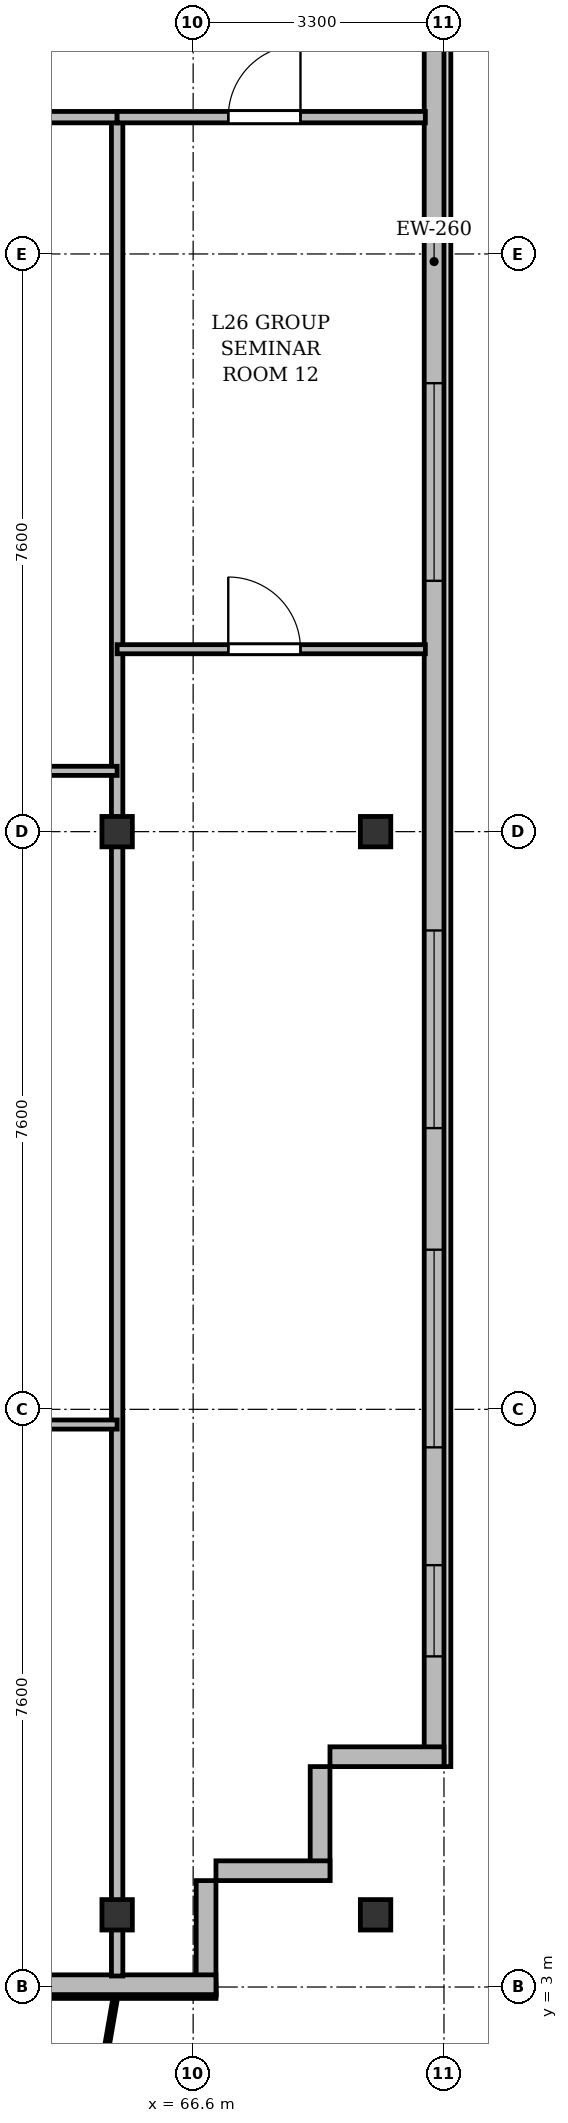
"""IFC4 building model, lengths in metres.
Left out: names, types, materials, properties, quantities, classifications, styles, units other than length and angle.
Written with IfcOpenShell. Run it as: python <this file> out.ifc"""

import sys

from ifc_helpers import new_model, si_unit, direction, frame, frame_2d, origin, origin_2d, place, context, subcontext, project, spatial, rectangle, i_section, extrude, source, transform, mapped, element, fill, save


model = new_model("IFC4")
c1 = context("Model", 3, precision=1e-05, world=origin(), true_north=direction((0.0, 1.0)))
c2 = subcontext(c1, "Body", "Model", "MODEL_VIEW")
j1 = project(units=[si_unit("LENGTHUNIT", "METRE"), si_unit("PLANEANGLEUNIT", "RADIAN")], contexts=[c1])
p1 = place(None, origin())
s1 = spatial("IfcSite", under=j1, at=p1, CompositionType="ELEMENT")
p2 = place(p1, origin())
s2 = spatial("IfcBuilding", under=s1, at=p2, CompositionType="ELEMENT")
p3 = place(p2, frame((0.0, 0.0, 103.3)))
s3 = spatial("IfcBuildingStorey", under=s2, at=p3, CompositionType="ELEMENT", Elevation=103.3)
m1 = source(origin(), c2, "Body", "SweptSolid", [
    extrude(i_section(OverallWidth=0.4, OverallDepth=0.4, WebThickness=0.022, FlangeThickness=0.035, at=origin_2d()), origin(), (0.0, 0.0, 1.0), 3.6),
])
for number, where, z_axis, x_axis in (
    (1, (65.6, 3.95, 0.0), (0.0, 0.0, 1.0), (1.0, 0.0, 0.0)),
    (2, (65.6, 18.2, 0.0), (0.0, 0.0, 1.0), (1.0, 0.0, 0.0)),
    (3, (69.0, 3.95, 0.0), (0.0, 0.0, 1.0), (1.0, 0.0, 0.0)),
    (4, (69.0, 18.2, 0.0), (0.0, 0.0, 1.0), (1.0, 0.0, 0.0)),
):
    element("IfcColumn", number, at=place(p3, frame(where, z_axis=z_axis, x_axis=x_axis)), inside=s3, PredefinedType="COLUMN", context=c2, shape_type="MappedRepresentation", body=[
        mapped(m1, transform((0.0, 0.0, 0.0), x_axis=(1.0, 0.0, 0.0), y_axis=(0.0, 1.0, 0.0), z_axis=(0.0, 0.0, 1.0), scale=1.0)),
    ])
p4 = place(p3, frame((69.77, 45.5, 0.0), z_axis=(0.0, 0.0, 1.0), x_axis=(0.0, -1.0, 0.0)))
e5 = element("IfcWall", 5, at=p4, inside=s3, PredefinedType="SOLIDWALL", context=c2, shape_type="SweptSolid", body=[
    extrude(rectangle(XDim=39.6, YDim=0.26, at=frame_2d((19.8, 0.0))), origin(), (0.0, 0.0, 1.0), 3.34),
])
p5 = place(p4, frame((36.95, 0.0, 0.92)))
e6 = element("IfcOpeningElement", 6, at=p5, cuts=e5, PredefinedType="OPENING", context=c2, shape_type="SweptSolid", body=[
    extrude(rectangle(XDim=1.2, YDim=1.65, at=frame_2d((0.6, 0.825))), frame((0.0, 0.14, 0.0), z_axis=(0.0, -1.0, 0.0), x_axis=(1.0, 0.0, 0.0)), (0.0, 0.0, 1.0), 0.28),
])
p6 = place(p4, frame((32.8, 0.0, 0.92)))
e7 = element("IfcOpeningElement", 7, at=p6, cuts=e5, PredefinedType="OPENING", context=c2, shape_type="SweptSolid", body=[
    extrude(rectangle(XDim=2.6, YDim=1.9, at=frame_2d((1.3, 0.95))), frame((0.0, 0.14, 0.0), z_axis=(0.0, -1.0, 0.0), x_axis=(1.0, 0.0, 0.0)), (0.0, 0.0, 1.0), 0.28),
])
p7 = place(p4, frame((28.6, 0.0, 0.92)))
e8 = element("IfcOpeningElement", 8, at=p7, cuts=e5, PredefinedType="OPENING", context=c2, shape_type="SweptSolid", body=[
    extrude(rectangle(XDim=2.6, YDim=1.9, at=frame_2d((1.3, 0.95))), frame((0.0, 0.14, 0.0), z_axis=(0.0, -1.0, 0.0), x_axis=(1.0, 0.0, 0.0)), (0.0, 0.0, 1.0), 0.28),
])
p8 = place(p4, frame((21.4, 0.0, 0.92)))
e9 = element("IfcOpeningElement", 9, at=p8, cuts=e5, PredefinedType="OPENING", context=c2, shape_type="SweptSolid", body=[
    extrude(rectangle(XDim=2.6, YDim=1.9, at=frame_2d((1.3, 0.95))), frame((0.0, 0.14, 0.0), z_axis=(0.0, -1.0, 0.0), x_axis=(1.0, 0.0, 0.0)), (0.0, 0.0, 1.0), 0.28),
])
p9 = place(p4, frame((7.4, 0.0, 0.92)))
e10 = element("IfcOpeningElement", 10, at=p9, cuts=e5, PredefinedType="OPENING", context=c2, shape_type="SweptSolid", body=[
    extrude(rectangle(XDim=2.6, YDim=1.9, at=frame_2d((1.3, 0.95))), frame((0.0, 0.14, 0.0), z_axis=(0.0, -1.0, 0.0), x_axis=(1.0, 0.0, 0.0)), (0.0, 0.0, 1.0), 0.28),
])
p10 = place(p4, frame((4.5, 0.0, 0.92)))
e11 = element("IfcOpeningElement", 11, at=p10, cuts=e5, PredefinedType="OPENING", context=c2, shape_type="SweptSolid", body=[
    extrude(rectangle(XDim=1.2, YDim=1.65, at=frame_2d((0.6, 0.825))), frame((0.0, 0.14, 0.0), z_axis=(0.0, -1.0, 0.0), x_axis=(1.0, 0.0, 0.0)), (0.0, 0.0, 1.0), 0.28),
])
p11 = place(p4, frame((1.15, 0.0, 0.92)))
e12 = element("IfcOpeningElement", 12, at=p11, cuts=e5, PredefinedType="OPENING", context=c2, shape_type="SweptSolid", body=[
    extrude(rectangle(XDim=1.2, YDim=1.65, at=frame_2d((0.6, 0.825))), frame((0.0, 0.14, 0.0), z_axis=(0.0, -1.0, 0.0), x_axis=(1.0, 0.0, 0.0)), (0.0, 0.0, 1.0), 0.28),
])
p12 = place(p3, frame((69.9, 6.03, 0.0), z_axis=(0.0, 0.0, 1.0), x_axis=(-1.0, 0.0, 0.0)))
e13 = element("IfcWall", 13, at=p12, inside=s3, PredefinedType="SOLIDWALL", context=c2, shape_type="SweptSolid", body=[
    extrude(rectangle(XDim=1.5, YDim=0.26, at=frame_2d((0.75, 0.0))), origin(), (0.0, 0.0, 1.0), 2.84),
])
for number, where, z_axis, x_axis in (
    (14, (68.27, 5.9, 0.0), (0.0, 0.0, 1.0), (0.0, -1.0, 0.0)),
    (15, (68.4, 4.53, 0.0), (0.0, 0.0, 1.0), (-1.0, 0.0, 0.0)),
):
    element("IfcWall", number, at=place(p3, frame(where, z_axis=z_axis, x_axis=x_axis)), inside=s3, PredefinedType="SOLIDWALL", context=c2, shape_type="SweptSolid", body=[
        extrude(rectangle(XDim=1.5, YDim=0.26, at=frame_2d((0.75, 0.0))), origin(), (0.0, 0.0, 1.0), 3.34),
    ])
p13 = place(p3, frame((66.77, 4.4, 0.0), z_axis=(0.0, 0.0, 1.0), x_axis=(0.0, -1.0, 0.0)))
e16 = element("IfcWall", 16, at=p13, inside=s3, PredefinedType="SOLIDWALL", context=c2, shape_type="SweptSolid", body=[
    extrude(rectangle(XDim=1.5, YDim=0.26, at=frame_2d((0.75, 0.0))), origin(), (0.0, 0.0, 1.0), 2.752),
])
p14 = place(p3, frame((66.9, 3.03, 0.0), z_axis=(0.0, 0.0, 1.0), x_axis=(-1.0, 0.0, 0.0)))
e17 = element("IfcWall", 17, at=p14, inside=s3, PredefinedType="SOLIDWALL", context=c2, shape_type="SweptSolid", body=[
    extrude(rectangle(XDim=59.4, YDim=0.26, at=frame_2d((29.7, 0.0))), origin(), (0.0, 0.0, 1.0), 3.34),
])
p15 = place(p14, frame((2.25, 0.0, 0.9)))
e18 = element("IfcOpeningElement", 18, at=p15, cuts=e17, PredefinedType="OPENING", context=c2, shape_type="SweptSolid", body=[
    extrude(rectangle(XDim=1.5, YDim=1.75, at=frame_2d((0.75, 0.875))), frame((0.0, 0.14, 0.0), z_axis=(0.0, -1.0, 0.0), x_axis=(1.0, 0.0, 0.0)), (0.0, 0.0, 1.0), 0.28),
])
p16 = place(p14, frame((5.4, 0.0, 0.9)))
e19 = element("IfcOpeningElement", 19, at=p16, cuts=e17, PredefinedType="OPENING", context=c2, shape_type="SweptSolid", body=[
    extrude(rectangle(XDim=2.0, YDim=1.95, at=frame_2d((1.0, 0.975))), frame((0.0, 0.14, 0.0), z_axis=(0.0, -1.0, 0.0), x_axis=(1.0, 0.0, 0.0)), (0.0, 0.0, 1.0), 0.28),
])
p17 = place(p14, frame((9.213, 0.0, 0.0)))
e20 = element("IfcOpeningElement", 20, at=p17, cuts=e17, PredefinedType="OPENING", context=c2, shape_type="SweptSolid", body=[
    extrude(rectangle(XDim=1.2, YDim=2.2, at=frame_2d((0.6, 1.1))), frame((0.0, 0.14, 0.0), z_axis=(0.0, -1.0, 0.0), x_axis=(1.0, 0.0, 0.0)), (0.0, 0.0, 1.0), 0.28),
])
p18 = place(p14, frame((13.0, 0.0, 0.9)))
e21 = element("IfcOpeningElement", 21, at=p18, cuts=e17, PredefinedType="OPENING", context=c2, shape_type="SweptSolid", body=[
    extrude(rectangle(XDim=1.8, YDim=1.8, at=frame_2d((0.9, 0.9))), frame((0.0, 0.14, 0.0), z_axis=(0.0, -1.0, 0.0), x_axis=(1.0, 0.0, 0.0)), (0.0, 0.0, 1.0), 0.28),
])
p19 = place(p14, frame((16.6, 0.0, 0.9)))
e22 = element("IfcOpeningElement", 22, at=p19, cuts=e17, PredefinedType="OPENING", context=c2, shape_type="SweptSolid", body=[
    extrude(rectangle(XDim=2.2, YDim=1.8, at=frame_2d((1.1, 0.9))), frame((0.0, 0.14, 0.0), z_axis=(0.0, -1.0, 0.0), x_axis=(1.0, 0.0, 0.0)), (0.0, 0.0, 1.0), 0.28),
])
p20 = place(p14, frame((20.55, 0.0, 0.9)))
e23 = element("IfcOpeningElement", 23, at=p20, cuts=e17, PredefinedType="OPENING", context=c2, shape_type="SweptSolid", body=[
    extrude(rectangle(XDim=1.5, YDim=1.75, at=frame_2d((0.75, 0.875))), frame((0.0, 0.14, 0.0), z_axis=(0.0, -1.0, 0.0), x_axis=(1.0, 0.0, 0.0)), (0.0, 0.0, 1.0), 0.28),
])
p21 = place(p14, frame((25.4, 0.0, 0.9)))
e24 = element("IfcOpeningElement", 24, at=p21, cuts=e17, PredefinedType="OPENING", context=c2, shape_type="SweptSolid", body=[
    extrude(rectangle(XDim=2.0, YDim=1.95, at=frame_2d((1.0, 0.975))), frame((0.0, 0.14, 0.0), z_axis=(0.0, -1.0, 0.0), x_axis=(1.0, 0.0, 0.0)), (0.0, 0.0, 1.0), 0.28),
])
p22 = place(p14, frame((32.175, 0.0, 0.9)))
e25 = element("IfcOpeningElement", 25, at=p22, cuts=e17, PredefinedType="OPENING", context=c2, shape_type="SweptSolid", body=[
    extrude(rectangle(XDim=1.65, YDim=1.85, at=frame_2d((0.825, 0.925))), frame((0.0, 0.14, 0.0), z_axis=(0.0, -1.0, 0.0), x_axis=(1.0, 0.0, 0.0)), (0.0, 0.0, 1.0), 0.28),
])
p23 = place(p14, frame((37.584, 0.0, 0.0)))
e26 = element("IfcOpeningElement", 26, at=p23, cuts=e17, PredefinedType="OPENING", context=c2, shape_type="SweptSolid", body=[
    extrude(rectangle(XDim=1.2, YDim=2.2, at=frame_2d((0.6, 1.1))), frame((0.0, 0.14, 0.0), z_axis=(0.0, -1.0, 0.0), x_axis=(1.0, 0.0, 0.0)), (0.0, 0.0, 1.0), 0.28),
])
p24 = place(p14, frame((40.5, 0.0, 0.9)))
e27 = element("IfcOpeningElement", 27, at=p24, cuts=e17, PredefinedType="OPENING", context=c2, shape_type="SweptSolid", body=[
    extrude(rectangle(XDim=2.2, YDim=1.8, at=frame_2d((1.1, 0.9))), frame((0.0, 0.14, 0.0), z_axis=(0.0, -1.0, 0.0), x_axis=(1.0, 0.0, 0.0)), (0.0, 0.0, 1.0), 0.28),
])
p25 = place(p14, frame((46.65, 0.0, 0.9)))
e28 = element("IfcOpeningElement", 28, at=p25, cuts=e17, PredefinedType="OPENING", context=c2, shape_type="SweptSolid", body=[
    extrude(rectangle(XDim=1.5, YDim=1.75, at=frame_2d((0.75, 0.875))), frame((0.0, 0.14, 0.0), z_axis=(0.0, -1.0, 0.0), x_axis=(1.0, 0.0, 0.0)), (0.0, 0.0, 1.0), 0.28),
])
p26 = place(p14, frame((55.817, 0.0, 0.0)))
e29 = element("IfcOpeningElement", 29, at=p26, cuts=e17, PredefinedType="OPENING", context=c2, shape_type="SweptSolid", body=[
    extrude(rectangle(XDim=1.2, YDim=2.2, at=frame_2d((0.6, 1.1))), frame((0.0, 0.14, 0.0), z_axis=(0.0, -1.0, 0.0), x_axis=(1.0, 0.0, 0.0)), (0.0, 0.0, 1.0), 0.28),
])
p27 = place(p3, frame((65.6, 3.145, 0.0), z_axis=(0.0, 0.0, 1.0), x_axis=(0.0, 1.0, 0.0)))
e30 = element("IfcWall", 30, at=p27, inside=s3, PredefinedType="PARTITIONING", context=c2, shape_type="SweptSolid", body=[
    extrude(rectangle(XDim=24.455, YDim=0.15, at=frame_2d((12.228, 0.0))), origin(), (0.0, 0.0, 1.0), 2.84),
])
p28 = place(p3, frame((58.8, 19.0, 0.0), z_axis=(0.0, 0.0, 1.0), x_axis=(1.0, 0.0, 0.0)))
e31 = element("IfcWall", 31, at=p28, inside=s3, PredefinedType="PARTITIONING", context=c2, shape_type="SweptSolid", body=[
    extrude(rectangle(XDim=6.8, YDim=0.12, at=frame_2d((3.4, 0.0))), origin(), (0.0, 0.0, 1.0), 2.84),
])
p29 = place(p28, frame((2.925, 0.0, 0.0)))
e32 = element("IfcOpeningElement", 32, at=p29, cuts=e31, PredefinedType="OPENING", context=c2, shape_type="SweptSolid", body=[
    extrude(rectangle(XDim=0.95, YDim=2.15, at=frame_2d((0.475, 1.075))), frame((0.0, 0.07, 0.0), z_axis=(0.0, -1.0, 0.0), x_axis=(1.0, 0.0, 0.0)), (0.0, 0.0, 1.0), 0.14),
])
p30 = place(p3, frame((58.8, 27.6, 0.0), z_axis=(0.0, 0.0, 1.0), x_axis=(1.0, 0.0, 0.0)))
e33 = element("IfcWall", 33, at=p30, inside=s3, PredefinedType="PARTITIONING", context=c2, shape_type="SweptSolid", body=[
    extrude(rectangle(XDim=6.8, YDim=0.15, at=frame_2d((3.4, 0.0))), origin(), (0.0, 0.0, 1.0), 2.84),
])
p31 = place(p30, frame((4.49, 0.0, 0.0)))
e34 = element("IfcOpeningElement", 34, at=p31, cuts=e33, PredefinedType="OPENING", context=c2, shape_type="SweptSolid", body=[
    extrude(rectangle(XDim=0.95, YDim=2.15, at=frame_2d((0.475, 1.075))), frame((0.0, 0.085, 0.0), z_axis=(0.0, -1.0, 0.0), x_axis=(1.0, 0.0, 0.0)), (0.0, 0.0, 1.0), 0.17),
])
p32 = place(p3, frame((62.2, 10.4, 0.0), z_axis=(0.0, 0.0, 1.0), x_axis=(1.0, 0.0, 0.0)))
e35 = element("IfcWall", 35, at=p32, inside=s3, PredefinedType="PARTITIONING", context=c2, shape_type="SweptSolid", body=[
    extrude(rectangle(XDim=3.4, YDim=0.12, at=frame_2d((1.7, 0.0))), origin(), (0.0, 0.0, 1.0), 2.84),
])
p33 = place(p32, frame((1.131, 0.0, 0.0)))
e36 = element("IfcOpeningElement", 36, at=p33, cuts=e35, PredefinedType="OPENING", context=c2, shape_type="SweptSolid", body=[
    extrude(rectangle(XDim=0.95, YDim=2.15, at=frame_2d((0.475, 1.075))), frame((0.0, 0.07, 0.0), z_axis=(0.0, -1.0, 0.0), x_axis=(1.0, 0.0, 0.0)), (0.0, 0.0, 1.0), 0.14),
])
p34 = place(p3, frame((65.6, 27.6, 0.0), z_axis=(0.0, 0.0, 1.0), x_axis=(1.0, 0.0, 0.0)))
e37 = element("IfcWall", 37, at=p34, inside=s3, PredefinedType="PARTITIONING", context=c2, shape_type="SweptSolid", body=[
    extrude(rectangle(XDim=4.055, YDim=0.15, at=frame_2d((2.027, 0.0))), origin(), (0.0, 0.0, 1.0), 2.84),
])
p35 = place(p34, frame((1.462, 0.0, 0.0)))
e38 = element("IfcOpeningElement", 38, at=p35, cuts=e37, PredefinedType="OPENING", context=c2, shape_type="SweptSolid", body=[
    extrude(rectangle(XDim=0.95, YDim=2.15, at=frame_2d((0.475, 1.075))), frame((0.0, 0.085, 0.0), z_axis=(0.0, -1.0, 0.0), x_axis=(1.0, 0.0, 0.0)), (0.0, 0.0, 1.0), 0.17),
])
p36 = place(p3, frame((65.6, 20.6, 0.0), z_axis=(0.0, 0.0, 1.0), x_axis=(1.0, 0.0, 0.0)))
e39 = element("IfcWall", 39, at=p36, inside=s3, PredefinedType="PARTITIONING", context=c2, shape_type="SweptSolid", body=[
    extrude(rectangle(XDim=4.055, YDim=0.12, at=frame_2d((2.027, 0.0))), origin(), (0.0, 0.0, 1.0), 2.84),
])
p37 = place(p36, frame((1.462, 0.0, 0.0)))
e40 = element("IfcOpeningElement", 40, at=p37, cuts=e39, PredefinedType="OPENING", context=c2, shape_type="SweptSolid", body=[
    extrude(rectangle(XDim=0.95, YDim=2.15, at=frame_2d((0.475, 1.075))), frame((0.0, 0.07, 0.0), z_axis=(0.0, -1.0, 0.0), x_axis=(1.0, 0.0, 0.0)), (0.0, 0.0, 1.0), 0.14),
])
m2 = source(origin(), c2, "Body", "SweptSolid", [
    extrude(rectangle(XDim=1.2, YDim=1.65, at=frame_2d((0.6, 0.825))), frame((0.0, 0.03, 0.0), z_axis=(0.0, -1.0, 0.0), x_axis=(1.0, 0.0, 0.0)), (0.0, 0.0, 1.0), 0.06),
])
p38 = place(p5, origin())
e41 = element("IfcWindow", 41, at=p38, inside=s3, PartitioningType="SINGLE_PANEL", PredefinedType="WINDOW", context=c2, shape_type="MappedRepresentation", body=[
    mapped(m2, transform((0.0, 0.0, 0.0), x_axis=(1.0, 0.0, 0.0), y_axis=(0.0, 1.0, 0.0), z_axis=(0.0, 0.0, 1.0), scale=1.0)),
])
fill(e6, e41)
m3 = source(origin(), c2, "Body", "SweptSolid", [
    extrude(rectangle(XDim=2.6, YDim=1.9, at=frame_2d((1.3, 0.95))), frame((0.0, 0.03, 0.0), z_axis=(0.0, -1.0, 0.0), x_axis=(1.0, 0.0, 0.0)), (0.0, 0.0, 1.0), 0.06),
])
p39 = place(p6, origin())
e42 = element("IfcWindow", 42, at=p39, inside=s3, PartitioningType="SINGLE_PANEL", PredefinedType="WINDOW", context=c2, shape_type="MappedRepresentation", body=[
    mapped(m3, transform((0.0, 0.0, 0.0), x_axis=(1.0, 0.0, 0.0), y_axis=(0.0, 1.0, 0.0), z_axis=(0.0, 0.0, 1.0), scale=1.0)),
])
fill(e7, e42)
p40 = place(p7, origin())
e43 = element("IfcWindow", 43, at=p40, inside=s3, PartitioningType="SINGLE_PANEL", PredefinedType="WINDOW", context=c2, shape_type="MappedRepresentation", body=[
    mapped(m3, transform((0.0, 0.0, 0.0), x_axis=(1.0, 0.0, 0.0), y_axis=(0.0, 1.0, 0.0), z_axis=(0.0, 0.0, 1.0), scale=1.0)),
])
fill(e8, e43)
p41 = place(p8, origin())
e44 = element("IfcWindow", 44, at=p41, inside=s3, PartitioningType="SINGLE_PANEL", PredefinedType="WINDOW", context=c2, shape_type="MappedRepresentation", body=[
    mapped(m3, transform((0.0, 0.0, 0.0), x_axis=(1.0, 0.0, 0.0), y_axis=(0.0, 1.0, 0.0), z_axis=(0.0, 0.0, 1.0), scale=1.0)),
])
fill(e9, e44)
m4 = source(origin(), c2, "Body", "SweptSolid", [
    extrude(rectangle(XDim=0.95, YDim=2.15, at=frame_2d((0.475, 1.075))), frame((0.0, 0.025, 0.0), z_axis=(0.0, -1.0, 0.0), x_axis=(1.0, 0.0, 0.0)), (0.0, 0.0, 1.0), 0.05),
])
p42 = place(p35, origin())
e45 = element("IfcDoor", 45, at=p42, inside=s3, OperationType="SINGLE_SWING_RIGHT", PredefinedType="DOOR", context=c2, shape_type="MappedRepresentation", body=[
    mapped(m4, transform((0.0, 0.0, 0.0), x_axis=(1.0, 0.0, 0.0), y_axis=(0.0, 1.0, 0.0), z_axis=(0.0, 0.0, 1.0), scale=1.0)),
])
fill(e38, e45)
p43 = place(p37, origin())
e46 = element("IfcDoor", 46, at=p43, inside=s3, OperationType="SINGLE_SWING_LEFT", PredefinedType="DOOR", context=c2, shape_type="MappedRepresentation", body=[
    mapped(m4, transform((0.0, 0.0, 0.0), x_axis=(1.0, 0.0, 0.0), y_axis=(0.0, 1.0, 0.0), z_axis=(0.0, 0.0, 1.0), scale=1.0)),
])
fill(e40, e46)
save(model, sys.argv[1])
